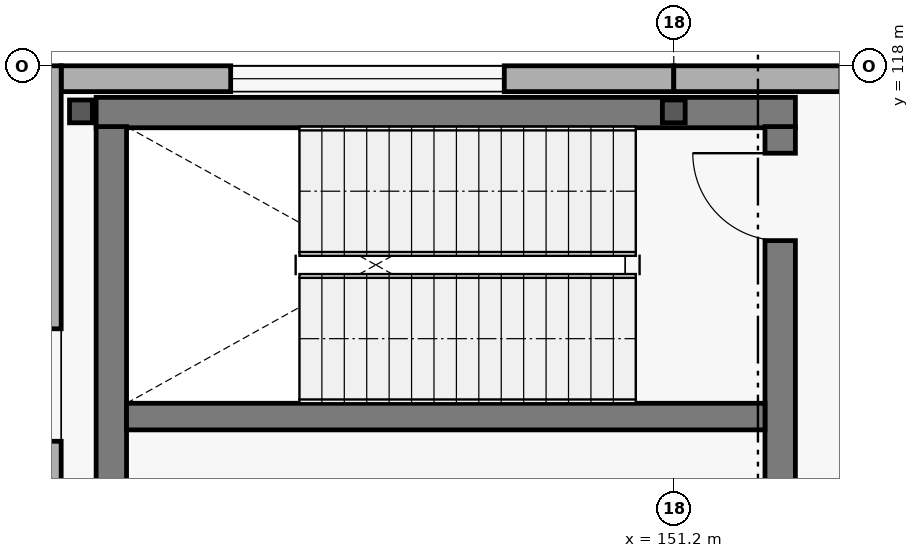
"""IFC4 building model, lengths in metres.
Left out: names, types, materials, properties, quantities, classifications, styles, units other than length and angle.
Written with IfcOpenShell. Run it as: python <this file> out.ifc"""

import sys

from ifc_helpers import new_model, si_unit, direction, frame, frame_2d, origin, origin_2d, place, context, subcontext, project, spatial, rectangle, i_section, extrude, element, fill, save


model = new_model("IFC4")
c1 = context("Model", 3, precision=1e-05, world=origin(), true_north=direction((0.0, 1.0)))
c2 = subcontext(c1, "Body", "Model", "MODEL_VIEW")
j1 = project(units=[si_unit("LENGTHUNIT", "METRE"), si_unit("PLANEANGLEUNIT", "RADIAN")], contexts=[c1])
p1 = place(None, origin())
s1 = spatial("IfcSite", under=j1, at=p1, CompositionType="ELEMENT")
p2 = place(p1, origin())
s2 = spatial("IfcBuilding", under=s1, at=p2, CompositionType="ELEMENT")
p3 = place(p2, frame((0.0, 0.0, 5.4)))
s3 = spatial("IfcBuildingStorey", under=s2, at=p3, CompositionType="ELEMENT", Elevation=5.4)
for number, where, z_axis, x_axis in (
    (1, (143.4, 117.4, 0.0), (0.0, 0.0, 1.0), (1.0, 0.0, 0.0)),
    (2, (151.2, 117.4, 0.0), (0.0, 0.0, 1.0), (1.0, 0.0, 0.0)),
):
    element("IfcColumn", number, at=place(p3, frame(where, z_axis=z_axis, x_axis=x_axis)), inside=s3, PredefinedType="COLUMN", context=c2, shape_type="SweptSolid", body=[
        extrude(i_section(OverallWidth=0.3, OverallDepth=0.3, WebThickness=0.011, FlangeThickness=0.019, at=origin_2d()), origin(), (0.0, 0.0, 1.0), 5.4),
    ])
p4 = place(p3, frame((143.14, 117.83, 0.0), z_axis=(0.0, 0.0, 1.0), x_axis=(1.0, 0.0, 0.0)))
e3 = element("IfcWall", 3, at=p4, inside=s3, PredefinedType="SOLIDWALL", context=c2, shape_type="SweptSolid", body=[
    extrude(rectangle(XDim=8.06, YDim=0.34, at=frame_2d((4.03, 0.0))), origin(), (0.0, 0.0, 1.0), 5.08),
])
p5 = place(p4, frame((2.23, 0.0, 0.9)))
e4 = element("IfcOpeningElement", 4, at=p5, cuts=e3, PredefinedType="OPENING", context=c2, shape_type="SweptSolid", body=[
    extrude(rectangle(XDim=3.6, YDim=2.3, at=frame_2d((1.8, 1.15))), frame((0.0, 0.18, 0.0), z_axis=(0.0, -1.0, 0.0), x_axis=(1.0, 0.0, 0.0)), (0.0, 0.0, 1.0), 0.36),
])
p6 = place(p3, frame((151.2, 117.83, 0.0), z_axis=(0.0, 0.0, 1.0), x_axis=(1.0, 0.0, 0.0)))
e5 = element("IfcWall", 5, at=p6, inside=s3, PredefinedType="SOLIDWALL", context=c2, shape_type="SweptSolid", body=[
    extrude(rectangle(XDim=8.4, YDim=0.34, at=frame_2d((4.2, 0.0))), origin(), (0.0, 0.0, 1.0), 5.08),
])
p7 = place(p6, frame((2.2, 0.0, 0.9)))
e6 = element("IfcOpeningElement", 6, at=p7, cuts=e5, PredefinedType="OPENING", context=c2, shape_type="SweptSolid", body=[
    extrude(rectangle(XDim=4.0, YDim=2.4, at=frame_2d((2.0, 1.2))), frame((0.0, 0.18, 0.0), z_axis=(0.0, -1.0, 0.0), x_axis=(1.0, 0.0, 0.0)), (0.0, 0.0, 1.0), 0.36),
])
p8 = place(p3, frame((142.97, 109.6, 0.0), z_axis=(0.0, 0.0, 1.0), x_axis=(0.0, 1.0, 0.0)))
e7 = element("IfcWall", 7, at=p8, inside=s3, PredefinedType="SOLIDWALL", context=c2, shape_type="SweptSolid", body=[
    extrude(rectangle(XDim=8.4, YDim=0.34, at=frame_2d((4.2, 0.0))), origin(), (0.0, 0.0, 1.0), 5.08),
])
p9 = place(p8, frame((3.46, 0.0, 0.9)))
e8 = element("IfcOpeningElement", 8, at=p9, cuts=e7, PredefinedType="OPENING", context=c2, shape_type="SweptSolid", body=[
    extrude(rectangle(XDim=1.48, YDim=1.8, at=frame_2d((0.74, 0.9))), frame((0.0, 0.18, 0.0), z_axis=(0.0, -1.0, 0.0), x_axis=(1.0, 0.0, 0.0)), (0.0, 0.0, 1.0), 0.36),
])
p10 = place(p3, frame((152.8, 117.385, 0.0), z_axis=(0.0, 0.0, 1.0), x_axis=(-1.0, 0.0, 0.0)))
e9 = element("IfcWall", 9, at=p10, inside=s3, PredefinedType="SHEAR", context=c2, shape_type="SweptSolid", body=[
    extrude(rectangle(XDim=9.2, YDim=0.4, at=frame_2d((4.6, 0.0))), origin(), (0.0, 0.0, 1.0), 5.08),
])
p11 = place(p3, frame((143.8, 117.2, 0.0), z_axis=(0.0, 0.0, 1.0), x_axis=(0.0, -1.0, 0.0)))
e10 = element("IfcWall", 10, at=p11, inside=s3, PredefinedType="SHEAR", context=c2, shape_type="SweptSolid", body=[
    extrude(rectangle(XDim=7.4, YDim=0.4, at=frame_2d((3.7, 0.0))), origin(), (0.0, 0.0, 1.0), 5.08),
])
p12 = place(p3, frame((152.6, 109.8, 0.0), z_axis=(0.0, 0.0, 1.0), x_axis=(0.0, 1.0, 0.0)))
e11 = element("IfcWall", 11, at=p12, inside=s3, PredefinedType="SHEAR", context=c2, shape_type="SweptSolid", body=[
    extrude(rectangle(XDim=7.4, YDim=0.4, at=frame_2d((3.7, 0.0))), origin(), (0.0, 0.0, 1.0), 5.08),
])
p13 = place(p12, frame((5.9, 0.0, 0.0)))
e12 = element("IfcOpeningElement", 12, at=p13, cuts=e11, PredefinedType="OPENING", context=c2, shape_type="SweptSolid", body=[
    extrude(rectangle(XDim=1.15, YDim=2.2, at=frame_2d((0.575, 1.1))), frame((0.0, 0.21, 0.0), z_axis=(0.0, -1.0, 0.0), x_axis=(1.0, 0.0, 0.0)), (0.0, 0.0, 1.0), 0.42),
])
p14 = place(p3, frame((144.0, 113.385, 0.0), z_axis=(0.0, 0.0, 1.0), x_axis=(1.0, 0.0, 0.0)))
e13 = element("IfcWall", 13, at=p14, inside=s3, PredefinedType="SHEAR", context=c2, shape_type="SweptSolid", body=[
    extrude(rectangle(XDim=8.4, YDim=0.35, at=frame_2d((4.2, 0.0))), origin(), (0.0, 0.0, 1.0), 5.08),
])
p15 = place(p5, origin())
e14 = element("IfcWindow", 14, at=p15, inside=s3, PartitioningType="SINGLE_PANEL", PredefinedType="WINDOW", context=c2, shape_type="SweptSolid", body=[
    extrude(rectangle(XDim=3.6, YDim=2.3, at=frame_2d((1.8, 1.15))), frame((0.0, 0.03, 0.0), z_axis=(0.0, -1.0, 0.0), x_axis=(1.0, 0.0, 0.0)), (0.0, 0.0, 1.0), 0.06),
])
fill(e4, e14)
p16 = place(p13, origin())
e15 = element("IfcDoor", 15, at=p16, inside=s3, OperationType="SINGLE_SWING_RIGHT", PredefinedType="DOOR", context=c2, shape_type="SweptSolid", body=[
    extrude(rectangle(XDim=1.15, YDim=2.2, at=frame_2d((0.575, 1.1))), frame((0.0, 0.025, 0.0), z_axis=(0.0, -1.0, 0.0), x_axis=(1.0, 0.0, 0.0)), (0.0, 0.0, 1.0), 0.05),
])
fill(e12, e15)
save(model, sys.argv[1])
